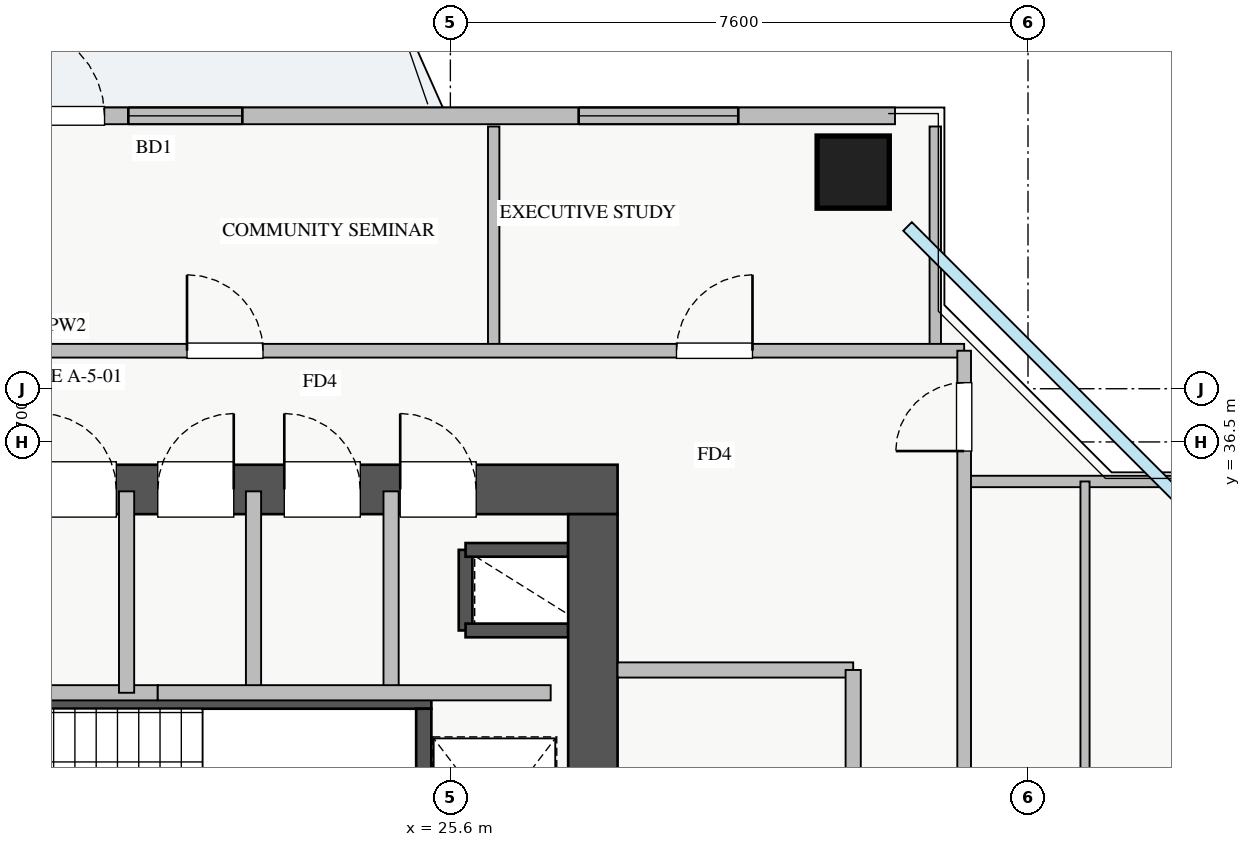
"""IFC4 building model, lengths in metres.
Left out: names, types, materials, properties, quantities, classifications, styles, units other than length and angle.
Written with IfcOpenShell. Run it as: python <this file> out.ifc"""

import sys

from ifc_helpers import new_model, si_unit, direction, frame, frame_2d, origin, origin_2d, place, context, subcontext, project, spatial, rectangle, extrude, source, transform, mapped, element, fill, save


model = new_model("IFC4")
c1 = context("Model", 3, precision=1e-05, world=origin(), true_north=direction((0.0, 1.0)))
c2 = subcontext(c1, "Body", "Model", "MODEL_VIEW")
j1 = project(units=[si_unit("LENGTHUNIT", "METRE"), si_unit("PLANEANGLEUNIT", "RADIAN")], contexts=[c1])
p1 = place(None, origin())
s1 = spatial("IfcSite", under=j1, at=p1, CompositionType="ELEMENT")
p2 = place(p1, origin())
s2 = spatial("IfcBuilding", under=s1, at=p2, CompositionType="ELEMENT")
p3 = place(p2, frame((0.0, 0.0, 143.75)))
s3 = spatial("IfcBuildingStorey", under=s2, at=p3, CompositionType="ELEMENT", Elevation=143.75)
p4 = place(p3, frame((25.8, 34.02, 0.0), z_axis=(0.0, 0.0, 1.0), x_axis=(0.0, 1.0, 0.0)))
e1 = element("IfcWall", 1, at=p4, inside=s3, PredefinedType="SHEAR", context=c2, shape_type="SweptSolid", body=[
    extrude(rectangle(XDim=1.06, YDim=0.18, at=frame_2d((0.53, 0.0))), origin(), (0.0, 0.0, 1.0), 3.07),
])
for number, where, z_axis, x_axis in (
    (2, (25.8, 35.08, 0.0), (0.0, 0.0, 1.0), (1.0, 0.0, 0.0)),
    (3, (25.8, 34.02, 0.0), (0.0, 0.0, 1.0), (1.0, 0.0, 0.0)),
):
    element("IfcWall", number, at=place(p3, frame(where, z_axis=z_axis, x_axis=x_axis)), inside=s3, PredefinedType="SHEAR", context=c2, shape_type="SweptSolid", body=[
        extrude(rectangle(XDim=1.35, YDim=0.18, at=frame_2d((0.675, 0.0))), origin(), (0.0, 0.0, 1.0), 3.07),
    ])
p5 = place(p3, frame((18.2, 33.09, 0.0), z_axis=(0.0, 0.0, 1.0), x_axis=(1.0, 0.0, 0.0)))
e4 = element("IfcWall", 4, at=p5, inside=s3, PredefinedType="SHEAR", context=c2, shape_type="SweptSolid", body=[
    extrude(rectangle(XDim=7.15, YDim=0.2, at=frame_2d((3.575, 0.0))), origin(), (0.0, 0.0, 1.0), 3.25),
])
p6 = place(p5, frame((0.35, 0.0, 0.0)))
e5 = element("IfcOpeningElement", 5, at=p6, cuts=e4, PredefinedType="OPENING", context=c2, shape_type="SweptSolid", body=[
    extrude(rectangle(XDim=1.1, YDim=2.05, at=frame_2d((0.55, 1.025))), frame((0.0, 0.11, 0.0), z_axis=(0.0, -1.0, 0.0), x_axis=(1.0, 0.0, 0.0)), (0.0, 0.0, 1.0), 0.22),
])
p7 = place(p3, frame((25.25, 30.05, 0.0), z_axis=(0.0, 0.0, 1.0), x_axis=(0.0, 1.0, 0.0)))
e6 = element("IfcWall", 6, at=p7, inside=s3, PredefinedType="SHEAR", context=c2, shape_type="SweptSolid", body=[
    extrude(rectangle(XDim=2.94, YDim=0.2, at=frame_2d((1.47, 0.0))), origin(), (0.0, 0.0, 1.0), 3.25),
])
p8 = place(p3, frame((10.2, 35.875, 0.0), z_axis=(0.0, 0.0, 1.0), x_axis=(1.0, 0.0, 0.0)))
e7 = element("IfcWall", 7, at=p8, inside=s3, PredefinedType="SHEAR", context=c2, shape_type="SweptSolid", body=[
    extrude(rectangle(XDim=17.6, YDim=0.65, at=frame_2d((8.8, 0.0))), origin(), (0.0, 0.0, 1.0), 3.25),
])
p9 = place(p8, frame((1.15, 0.0, 0.0)))
e8 = element("IfcOpeningElement", 8, at=p9, cuts=e7, PredefinedType="OPENING", context=c2, shape_type="SweptSolid", body=[
    extrude(rectangle(XDim=1.1, YDim=2.05, at=frame_2d((0.55, 1.025))), frame((0.0, 0.335, 0.0), z_axis=(0.0, -1.0, 0.0), x_axis=(1.0, 0.0, 0.0)), (0.0, 0.0, 1.0), 0.67),
])
p10 = place(p8, frame((8.3, 0.0, 0.0)))
e9 = element("IfcOpeningElement", 9, at=p10, cuts=e7, PredefinedType="OPENING", context=c2, shape_type="SweptSolid", body=[
    extrude(rectangle(XDim=1.1, YDim=2.05, at=frame_2d((0.55, 1.025))), frame((0.0, 0.335, 0.0), z_axis=(0.0, -1.0, 0.0), x_axis=(1.0, 0.0, 0.0)), (0.0, 0.0, 1.0), 0.67),
])
p11 = place(p8, frame((4.9, 0.0, 0.0)))
e10 = element("IfcOpeningElement", 10, at=p11, cuts=e7, PredefinedType="OPENING", context=c2, shape_type="SweptSolid", body=[
    extrude(rectangle(XDim=1.1, YDim=2.05, at=frame_2d((0.55, 1.025))), frame((0.0, 0.335, 0.0), z_axis=(0.0, -1.0, 0.0), x_axis=(1.0, 0.0, 0.0)), (0.0, 0.0, 1.0), 0.67),
])
p12 = place(p8, frame((14.74, 0.0, 0.0)))
e11 = element("IfcOpeningElement", 11, at=p12, cuts=e7, PredefinedType="OPENING", context=c2, shape_type="SweptSolid", body=[
    extrude(rectangle(XDim=1.0, YDim=2.05, at=frame_2d((0.5, 1.025))), frame((0.0, 0.335, 0.0), z_axis=(0.0, -1.0, 0.0), x_axis=(1.0, 0.0, 0.0)), (0.0, 0.0, 1.0), 0.67),
])
p13 = place(p8, frame((10.005, 0.0, 0.0)))
e12 = element("IfcOpeningElement", 12, at=p13, cuts=e7, PredefinedType="OPENING", context=c2, shape_type="SweptSolid", body=[
    extrude(rectangle(XDim=1.0, YDim=2.05, at=frame_2d((0.5, 1.025))), frame((0.0, 0.335, 0.0), z_axis=(0.0, -1.0, 0.0), x_axis=(1.0, 0.0, 0.0)), (0.0, 0.0, 1.0), 0.67),
])
p14 = place(p8, frame((11.55, 0.0, 0.0)))
e13 = element("IfcOpeningElement", 13, at=p14, cuts=e7, PredefinedType="OPENING", context=c2, shape_type="SweptSolid", body=[
    extrude(rectangle(XDim=1.0, YDim=2.05, at=frame_2d((0.5, 1.025))), frame((0.0, 0.335, 0.0), z_axis=(0.0, -1.0, 0.0), x_axis=(1.0, 0.0, 0.0)), (0.0, 0.0, 1.0), 0.67),
])
p15 = place(p8, frame((13.215, 0.0, 0.0)))
e14 = element("IfcOpeningElement", 14, at=p15, cuts=e7, PredefinedType="OPENING", context=c2, shape_type="SweptSolid", body=[
    extrude(rectangle(XDim=1.0, YDim=2.05, at=frame_2d((0.5, 1.025))), frame((0.0, 0.335, 0.0), z_axis=(0.0, -1.0, 0.0), x_axis=(1.0, 0.0, 0.0)), (0.0, 0.0, 1.0), 0.67),
])
p16 = place(p3, frame((27.475, 29.65, 0.0), z_axis=(0.0, 0.0, 1.0), x_axis=(0.0, 1.0, 0.0)))
e15 = element("IfcWall", 15, at=p16, inside=s3, PredefinedType="SHEAR", context=c2, shape_type="SweptSolid", body=[
    extrude(rectangle(XDim=5.9, YDim=0.65, at=frame_2d((2.95, 0.0))), origin(), (0.0, 0.0, 1.0), 3.25),
])
p17 = place(p16, frame((1.1, 0.0, 0.0)))
e16 = element("IfcOpeningElement", 16, at=p17, cuts=e15, PredefinedType="OPENING", context=c2, shape_type="SweptSolid", body=[
    extrude(rectangle(XDim=1.3, YDim=2.05, at=frame_2d((0.65, 1.025))), frame((0.0, 0.335, 0.0), z_axis=(0.0, -1.0, 0.0), x_axis=(1.0, 0.0, 0.0)), (0.0, 0.0, 1.0), 0.67),
])
m1 = source(origin(), c2, "Body", "SweptSolid", [
    extrude(rectangle(XDim=0.95, YDim=0.95, at=origin_2d()), origin(), (0.0, 0.0, 1.0), 3.25),
])
p18 = place(p3, frame((30.9, 40.05, 0.0), z_axis=(0.0, 0.0, 1.0), x_axis=(1.0, 0.0, 0.0)))
e17 = element("IfcColumn", 17, at=p18, inside=s3, PredefinedType="COLUMN", context=c2, shape_type="MappedRepresentation", body=[
    mapped(m1, transform((0.0, 0.0, 0.0), x_axis=(1.0, 0.0, 0.0), y_axis=(0.0, 1.0, 0.0), z_axis=(0.0, 0.0, 1.0), scale=1.0)),
])
p19 = place(p3, frame((6.55, 40.79, 0.0), z_axis=(0.0, 0.0, 1.0), x_axis=(1.0, 0.0, 0.0)))
e18 = element("IfcWall", 18, at=p19, inside=s3, PredefinedType="STANDARD", context=c2, shape_type="SweptSolid", body=[
    extrude(rectangle(XDim=24.9, YDim=0.22, at=frame_2d((12.45, 0.0))), origin(), (0.0, 0.0, 1.0), 2.61),
])
p20 = place(p19, frame((13.3, 0.0, 0.0)))
e19 = element("IfcOpeningElement", 19, at=p20, cuts=e18, PredefinedType="OPENING", context=c2, shape_type="SweptSolid", body=[
    extrude(rectangle(XDim=1.2, YDim=2.1, at=frame_2d((0.6, 1.05))), frame((0.0, 0.12, 0.0), z_axis=(0.0, -1.0, 0.0), x_axis=(1.0, 0.0, 0.0)), (0.0, 0.0, 1.0), 0.24),
])
p21 = place(p19, frame((0.357, 0.0, 0.9)))
e20 = element("IfcOpeningElement", 20, at=p21, cuts=e18, PredefinedType="OPENING", context=c2, shape_type="SweptSolid", body=[
    extrude(rectangle(XDim=1.5, YDim=1.5, at=frame_2d((0.75, 0.75))), frame((0.0, 0.12, 0.0), z_axis=(0.0, -1.0, 0.0), x_axis=(1.0, 0.0, 0.0)), (0.0, 0.0, 1.0), 0.24),
])
p22 = place(p19, frame((9.77, 0.0, 0.9)))
e21 = element("IfcOpeningElement", 21, at=p22, cuts=e18, PredefinedType="OPENING", context=c2, shape_type="SweptSolid", body=[
    extrude(rectangle(XDim=1.8, YDim=1.5, at=frame_2d((0.9, 0.75))), frame((0.0, 0.12, 0.0), z_axis=(0.0, -1.0, 0.0), x_axis=(1.0, 0.0, 0.0)), (0.0, 0.0, 1.0), 0.24),
])
p23 = place(p19, frame((14.813, 0.0, 0.9)))
e22 = element("IfcOpeningElement", 22, at=p23, cuts=e18, PredefinedType="OPENING", context=c2, shape_type="SweptSolid", body=[
    extrude(rectangle(XDim=1.5, YDim=1.45, at=frame_2d((0.75, 0.725))), frame((0.0, 0.12, 0.0), z_axis=(0.0, -1.0, 0.0), x_axis=(1.0, 0.0, 0.0)), (0.0, 0.0, 1.0), 0.24),
])
p24 = place(p19, frame((20.738, 0.0, 0.9)))
e23 = element("IfcOpeningElement", 23, at=p24, cuts=e18, PredefinedType="OPENING", context=c2, shape_type="SweptSolid", body=[
    extrude(rectangle(XDim=2.1, YDim=1.48, at=frame_2d((1.05, 0.74))), frame((0.0, 0.12, 0.0), z_axis=(0.0, -1.0, 0.0), x_axis=(1.0, 0.0, 0.0)), (0.0, 0.0, 1.0), 0.24),
])
p25 = place(p19, frame((4.136, 0.0, 0.9)))
e24 = element("IfcOpeningElement", 24, at=p25, cuts=e18, PredefinedType="OPENING", context=c2, shape_type="SweptSolid", body=[
    extrude(rectangle(XDim=2.4, YDim=1.5, at=frame_2d((1.2, 0.75))), frame((0.0, 0.12, 0.0), z_axis=(0.0, -1.0, 0.0), x_axis=(1.0, 0.0, 0.0)), (0.0, 0.0, 1.0), 0.24),
])
p26 = place(p3, frame((27.8, 33.5, 0.0), z_axis=(0.0, 0.0, 1.0), x_axis=(1.0, 0.0, 0.0)))
e25 = element("IfcWall", 25, at=p26, inside=s3, PredefinedType="PARTITIONING", context=c2, shape_type="SweptSolid", body=[
    extrude(rectangle(XDim=3.1, YDim=0.2, at=frame_2d((1.55, 0.0))), origin(), (0.0, 0.0, 1.0), 3.07),
])
p27 = place(p3, frame((30.9, 29.6, 0.0), z_axis=(0.0, 0.0, 1.0), x_axis=(0.0, 1.0, 0.0)))
e26 = element("IfcWall", 26, at=p27, inside=s3, PredefinedType="PARTITIONING", context=c2, shape_type="SweptSolid", body=[
    extrude(rectangle(XDim=3.9, YDim=0.2, at=frame_2d((1.95, 0.0))), origin(), (0.0, 0.0, 1.0), 3.07),
])
p28 = place(p27, frame((1.4, 0.0, 0.0)))
e27 = element("IfcOpeningElement", 27, at=p28, cuts=e26, PredefinedType="OPENING", context=c2, shape_type="SweptSolid", body=[
    extrude(rectangle(XDim=1.1, YDim=2.05, at=frame_2d((0.55, 1.025))), frame((0.0, 0.11, 0.0), z_axis=(0.0, -1.0, 0.0), x_axis=(1.0, 0.0, 0.0)), (0.0, 0.0, 1.0), 0.22),
])
p29 = place(p3, frame((24.82, 33.2, 0.0), z_axis=(0.0, 0.0, 1.0), x_axis=(0.0, 1.0, 0.0)))
e28 = element("IfcWall", 28, at=p29, inside=s3, PredefinedType="PARTITIONING", context=c2, shape_type="SweptSolid", body=[
    extrude(rectangle(XDim=2.65, YDim=0.2, at=frame_2d((1.325, 0.0))), origin(), (0.0, 0.0, 1.0), 3.07),
])
p30 = place(p3, frame((19.88, 33.2, 0.0), z_axis=(0.0, 0.0, 1.0), x_axis=(1.0, 0.0, 0.0)))
e29 = element("IfcWall", 29, at=p30, inside=s3, PredefinedType="PARTITIONING", context=c2, shape_type="SweptSolid", body=[
    extrude(rectangle(XDim=1.87, YDim=0.2, at=frame_2d((0.935, 0.0))), origin(), (0.0, 0.0, 1.0), 3.07),
])
for number, where, z_axis, x_axis in (
    (30, (21.34, 33.2, 0.0), (0.0, 0.0, 1.0), (0.0, 1.0, 0.0)),
    (31, (23.01, 33.2, 0.0), (0.0, 0.0, 1.0), (0.0, 1.0, 0.0)),
):
    element("IfcWall", number, at=place(p3, frame(where, z_axis=z_axis, x_axis=x_axis)), inside=s3, PredefinedType="PARTITIONING", context=c2, shape_type="SweptSolid", body=[
        extrude(rectangle(XDim=2.65, YDim=0.2, at=frame_2d((1.325, 0.0))), origin(), (0.0, 0.0, 1.0), 3.07),
    ])
p31 = place(p3, frame((21.75, 33.2, 0.0), z_axis=(0.0, 0.0, 1.0), x_axis=(1.0, 0.0, 0.0)))
e32 = element("IfcWall", 32, at=p31, inside=s3, PredefinedType="PARTITIONING", context=c2, shape_type="SweptSolid", body=[
    extrude(rectangle(XDim=5.17, YDim=0.2, at=frame_2d((2.585, 0.0))), origin(), (0.0, 0.0, 1.0), 3.07),
])
for number, where, z_axis, x_axis in (
    (33, (26.17, 37.7, 0.0), (0.0, 0.0, 1.0), (0.0, 1.0, 0.0)),
    (34, (31.98, 37.7, 0.0), (0.0, 0.0, 1.0), (0.0, 1.0, 0.0)),
):
    element("IfcWall", number, at=place(p3, frame(where, z_axis=z_axis, x_axis=x_axis)), inside=s3, PredefinedType="PARTITIONING", context=c2, shape_type="SweptSolid", body=[
        extrude(rectangle(XDim=2.95, YDim=0.15, at=frame_2d((1.475, 0.0))), origin(), (0.0, 0.0, 1.0), 3.07),
    ])
p32 = place(p3, frame((8.75, 37.7, 0.0), z_axis=(0.0, 0.0, 1.0), x_axis=(1.0, 0.0, 0.0)))
e35 = element("IfcWall", 35, at=p32, inside=s3, PredefinedType="PARTITIONING", context=c2, shape_type="SweptSolid", body=[
    extrude(rectangle(XDim=23.61, YDim=0.18, at=frame_2d((11.805, 0.0))), origin(), (0.0, 0.0, 1.0), 3.07),
])
p33 = place(p32, frame((2.795, 0.0, 0.0)))
e36 = element("IfcOpeningElement", 36, at=p33, cuts=e35, PredefinedType="OPENING", context=c2, shape_type="SweptSolid", body=[
    extrude(rectangle(XDim=1.0, YDim=2.05, at=frame_2d((0.5, 1.025))), frame((0.0, 0.1, 0.0), z_axis=(0.0, -1.0, 0.0), x_axis=(1.0, 0.0, 0.0)), (0.0, 0.0, 1.0), 0.2),
])
p34 = place(p32, frame((7.97, 0.0, 0.0)))
e37 = element("IfcOpeningElement", 37, at=p34, cuts=e35, PredefinedType="OPENING", context=c2, shape_type="SweptSolid", body=[
    extrude(rectangle(XDim=1.0, YDim=2.05, at=frame_2d((0.5, 1.025))), frame((0.0, 0.1, 0.0), z_axis=(0.0, -1.0, 0.0), x_axis=(1.0, 0.0, 0.0)), (0.0, 0.0, 1.0), 0.2),
])
p35 = place(p32, frame((13.385, 0.0, 0.0)))
e38 = element("IfcOpeningElement", 38, at=p35, cuts=e35, PredefinedType="OPENING", context=c2, shape_type="SweptSolid", body=[
    extrude(rectangle(XDim=1.0, YDim=2.05, at=frame_2d((0.5, 1.025))), frame((0.0, 0.1, 0.0), z_axis=(0.0, -1.0, 0.0), x_axis=(1.0, 0.0, 0.0)), (0.0, 0.0, 1.0), 0.2),
])
p36 = place(p32, frame((19.825, 0.0, 0.0)))
e39 = element("IfcOpeningElement", 39, at=p36, cuts=e35, PredefinedType="OPENING", context=c2, shape_type="SweptSolid", body=[
    extrude(rectangle(XDim=1.0, YDim=2.05, at=frame_2d((0.5, 1.025))), frame((0.0, 0.1, 0.0), z_axis=(0.0, -1.0, 0.0), x_axis=(1.0, 0.0, 0.0)), (0.0, 0.0, 1.0), 0.2),
])
p37 = place(p3, frame((32.36, 35.98, 0.0), z_axis=(0.0, 0.0, 1.0), x_axis=(1.0, 0.0, 0.0)))
e40 = element("IfcWall", 40, at=p37, inside=s3, PredefinedType="PARTITIONING", context=c2, shape_type="SweptSolid", body=[
    extrude(rectangle(XDim=4.29, YDim=0.15, at=frame_2d((2.145, 0.0))), origin(), (0.0, 0.0, 1.0), 3.07),
])
p38 = place(p3, frame((33.95, 30.32, 0.0), z_axis=(0.0, 0.0, 1.0), x_axis=(0.0, 1.0, 0.0)))
e41 = element("IfcWall", 41, at=p38, inside=s3, PredefinedType="PLUMBINGWALL", context=c2, shape_type="SweptSolid", body=[
    extrude(rectangle(XDim=5.66, YDim=0.12, at=frame_2d((2.83, 0.0))), origin(), (0.0, 0.0, 1.0), 3.07),
])
p39 = place(p3, frame((32.36, 8.3, 0.0), z_axis=(0.0, 0.0, 1.0), x_axis=(0.0, 1.0, 0.0)))
e42 = element("IfcWall", 42, at=p39, inside=s3, PredefinedType="PARTITIONING", context=c2, shape_type="SweptSolid", body=[
    extrude(rectangle(XDim=29.4, YDim=0.18, at=frame_2d((14.7, 0.0))), origin(), (0.0, 0.0, 1.0), 3.07),
])
p40 = place(p39, frame((28.08, 0.0, 0.0)))
e43 = element("IfcOpeningElement", 43, at=p40, cuts=e42, PredefinedType="OPENING", context=c2, shape_type="SweptSolid", body=[
    extrude(rectangle(XDim=0.9, YDim=2.05, at=frame_2d((0.45, 1.025))), frame((0.0, 0.1, 0.0), z_axis=(0.0, -1.0, 0.0), x_axis=(1.0, 0.0, 0.0)), (0.0, 0.0, 1.0), 0.2),
])
p41 = place(p39, frame((0.42, 0.0, 0.0)))
e44 = element("IfcOpeningElement", 44, at=p41, cuts=e42, PredefinedType="OPENING", context=c2, shape_type="SweptSolid", body=[
    extrude(rectangle(XDim=0.9, YDim=2.05, at=frame_2d((0.45, 1.025))), frame((0.0, 0.1, 0.0), z_axis=(0.0, -1.0, 0.0), x_axis=(1.0, 0.0, 0.0)), (0.0, 0.0, 1.0), 0.2),
])
p42 = place(p39, frame((8.05, 0.0, 0.0)))
e45 = element("IfcOpeningElement", 45, at=p42, cuts=e42, PredefinedType="OPENING", context=c2, shape_type="SweptSolid", body=[
    extrude(rectangle(XDim=1.0, YDim=2.05, at=frame_2d((0.5, 1.025))), frame((0.0, 0.1, 0.0), z_axis=(0.0, -1.0, 0.0), x_axis=(1.0, 0.0, 0.0)), (0.0, 0.0, 1.0), 0.2),
])
p43 = place(p39, frame((18.01, 0.0, 0.0)))
e46 = element("IfcOpeningElement", 46, at=p43, cuts=e42, PredefinedType="OPENING", context=c2, shape_type="SweptSolid", body=[
    extrude(rectangle(XDim=1.0, YDim=2.05, at=frame_2d((0.5, 1.025))), frame((0.0, 0.1, 0.0), z_axis=(0.0, -1.0, 0.0), x_axis=(1.0, 0.0, 0.0)), (0.0, 0.0, 1.0), 0.2),
])
m2 = source(origin(), c2, "Body", "SweptSolid", [
    extrude(rectangle(XDim=1.2, YDim=2.1, at=frame_2d((0.6, 1.05))), frame((0.0, 0.025, 0.0), z_axis=(0.0, -1.0, 0.0), x_axis=(1.0, 0.0, 0.0)), (0.0, 0.0, 1.0), 0.05),
])
p44 = place(p20, origin())
e47 = element("IfcDoor", 47, at=p44, inside=s3, OperationType="SINGLE_SWING_LEFT", PredefinedType="DOOR", context=c2, shape_type="MappedRepresentation", body=[
    mapped(m2, transform((0.0, 0.0, 0.0), x_axis=(1.0, 0.0, 0.0), y_axis=(0.0, 1.0, 0.0), z_axis=(0.0, 0.0, 1.0), scale=1.0)),
])
fill(e19, e47)
m3 = source(origin(), c2, "Body", "SweptSolid", [
    extrude(rectangle(XDim=1.5, YDim=1.45, at=frame_2d((0.75, 0.725))), frame((0.0, 0.03, 0.0), z_axis=(0.0, -1.0, 0.0), x_axis=(1.0, 0.0, 0.0)), (0.0, 0.0, 1.0), 0.06),
])
p45 = place(p23, origin())
e48 = element("IfcWindow", 48, at=p45, inside=s3, PartitioningType="DOUBLE_PANEL_VERTICAL", PredefinedType="WINDOW", context=c2, shape_type="MappedRepresentation", body=[
    mapped(m3, transform((0.0, 0.0, 0.0), x_axis=(1.0, 0.0, 0.0), y_axis=(0.0, 1.0, 0.0), z_axis=(0.0, 0.0, 1.0), scale=1.0)),
])
fill(e22, e48)
m4 = source(origin(), c2, "Body", "SweptSolid", [
    extrude(rectangle(XDim=2.1, YDim=1.48, at=frame_2d((1.05, 0.74))), frame((0.0, 0.03, 0.0), z_axis=(0.0, -1.0, 0.0), x_axis=(1.0, 0.0, 0.0)), (0.0, 0.0, 1.0), 0.06),
])
p46 = place(p24, origin())
e49 = element("IfcWindow", 49, at=p46, inside=s3, PartitioningType="TRIPLE_PANEL_VERTICAL", PredefinedType="WINDOW", context=c2, shape_type="MappedRepresentation", body=[
    mapped(m4, transform((0.0, 0.0, 0.0), x_axis=(1.0, 0.0, 0.0), y_axis=(0.0, 1.0, 0.0), z_axis=(0.0, 0.0, 1.0), scale=1.0)),
])
fill(e23, e49)
m5 = source(origin(), c2, "Body", "SweptSolid", [
    extrude(rectangle(XDim=1.0, YDim=2.05, at=frame_2d((0.5, 1.025))), frame((0.0, 0.025, 0.0), z_axis=(0.0, -1.0, 0.0), x_axis=(1.0, 0.0, 0.0)), (0.0, 0.0, 1.0), 0.05),
])
p47 = place(p12, origin())
e50 = element("IfcDoor", 50, at=p47, inside=s3, OperationType="SINGLE_SWING_LEFT", PredefinedType="DOOR", context=c2, shape_type="MappedRepresentation", body=[
    mapped(m5, transform((0.0, 0.0, 0.0), x_axis=(1.0, 0.0, 0.0), y_axis=(0.0, 1.0, 0.0), z_axis=(0.0, 0.0, 1.0), scale=1.0)),
])
fill(e11, e50)
p48 = place(p13, origin())
e51 = element("IfcDoor", 51, at=p48, inside=s3, OperationType="SINGLE_SWING_LEFT", PredefinedType="DOOR", context=c2, shape_type="MappedRepresentation", body=[
    mapped(m5, transform((0.0, 0.0, 0.0), x_axis=(1.0, 0.0, 0.0), y_axis=(0.0, 1.0, 0.0), z_axis=(0.0, 0.0, 1.0), scale=1.0)),
])
fill(e12, e51)
p49 = place(p14, origin())
e52 = element("IfcDoor", 52, at=p49, inside=s3, OperationType="SINGLE_SWING_RIGHT", PredefinedType="DOOR", context=c2, shape_type="MappedRepresentation", body=[
    mapped(m5, transform((0.0, 0.0, 0.0), x_axis=(1.0, 0.0, 0.0), y_axis=(0.0, 1.0, 0.0), z_axis=(0.0, 0.0, 1.0), scale=1.0)),
])
fill(e13, e52)
p50 = place(p15, origin())
e53 = element("IfcDoor", 53, at=p50, inside=s3, OperationType="SINGLE_SWING_LEFT", PredefinedType="DOOR", context=c2, shape_type="MappedRepresentation", body=[
    mapped(m5, transform((0.0, 0.0, 0.0), x_axis=(1.0, 0.0, 0.0), y_axis=(0.0, 1.0, 0.0), z_axis=(0.0, 0.0, 1.0), scale=1.0)),
])
fill(e14, e53)
p51 = place(p35, origin())
e54 = element("IfcDoor", 54, at=p51, inside=s3, OperationType="SINGLE_SWING_LEFT", PredefinedType="DOOR", context=c2, shape_type="MappedRepresentation", body=[
    mapped(m5, transform((0.0, 0.0, 0.0), x_axis=(1.0, 0.0, 0.0), y_axis=(0.0, 1.0, 0.0), z_axis=(0.0, 0.0, 1.0), scale=1.0)),
])
fill(e38, e54)
p52 = place(p36, origin())
e55 = element("IfcDoor", 55, at=p52, inside=s3, OperationType="SINGLE_SWING_RIGHT", PredefinedType="DOOR", context=c2, shape_type="MappedRepresentation", body=[
    mapped(m5, transform((0.0, 0.0, 0.0), x_axis=(1.0, 0.0, 0.0), y_axis=(0.0, 1.0, 0.0), z_axis=(0.0, 0.0, 1.0), scale=1.0)),
])
fill(e39, e55)
m6 = source(origin(), c2, "Body", "SweptSolid", [
    extrude(rectangle(XDim=0.9, YDim=2.05, at=frame_2d((0.45, 1.025))), frame((0.0, 0.025, 0.0), z_axis=(0.0, -1.0, 0.0), x_axis=(1.0, 0.0, 0.0)), (0.0, 0.0, 1.0), 0.05),
])
p53 = place(p40, origin())
e56 = element("IfcDoor", 56, at=p53, inside=s3, OperationType="SINGLE_SWING_LEFT", PredefinedType="DOOR", context=c2, shape_type="MappedRepresentation", body=[
    mapped(m6, transform((0.0, 0.0, 0.0), x_axis=(1.0, 0.0, 0.0), y_axis=(0.0, 1.0, 0.0), z_axis=(0.0, 0.0, 1.0), scale=1.0)),
])
fill(e43, e56)
save(model, sys.argv[1])
